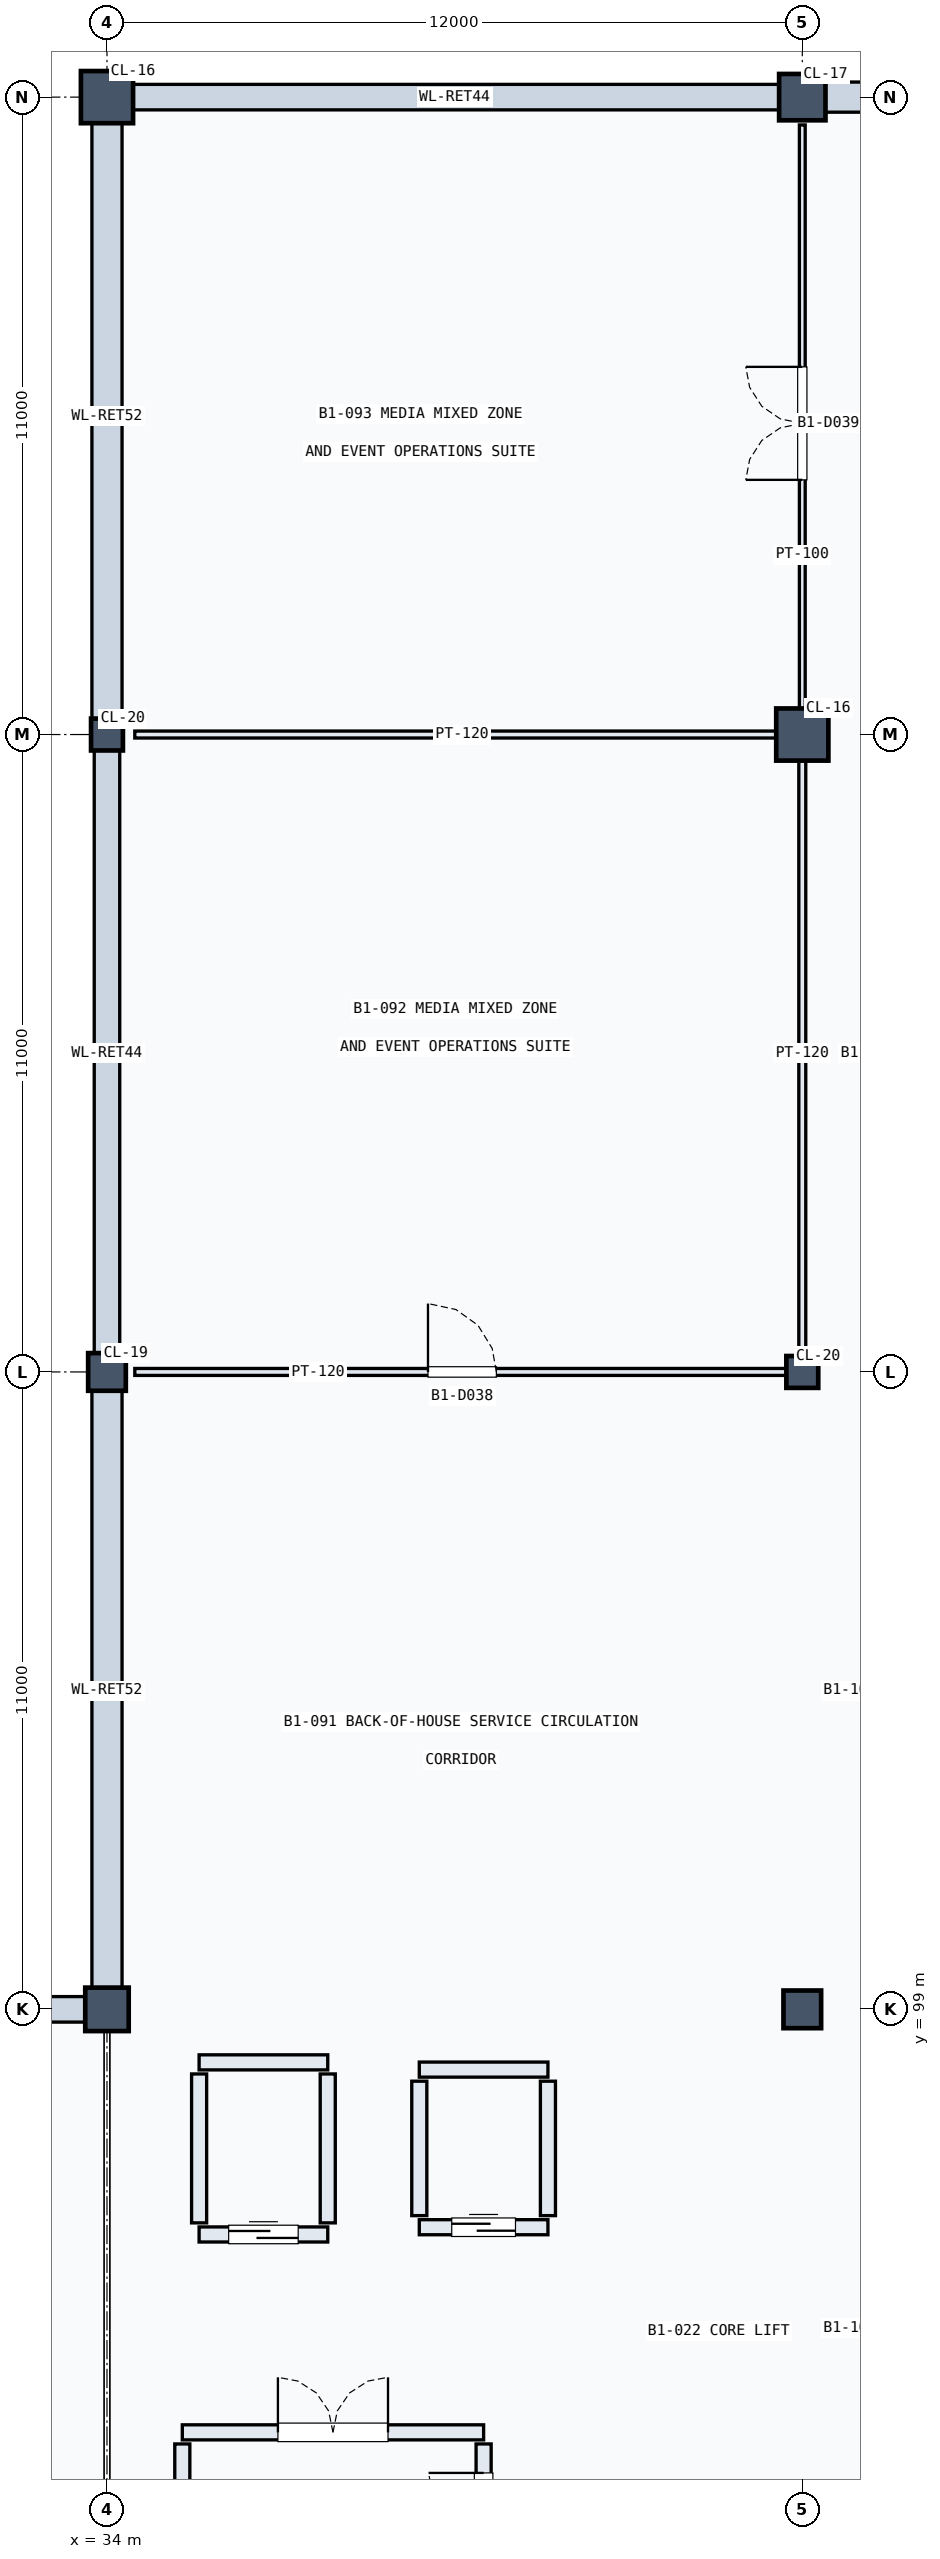
"""IFC4 building model, lengths in metres.
Left out: names, types, materials, properties, quantities, classifications, styles, units other than length and angle.
Written with IfcOpenShell. Run it as: python <this file> out.ifc"""

import sys

from ifc_helpers import new_model, si_unit, direction, frame, frame_2d, origin, origin_2d, place, context, subcontext, project, spatial, rectangle, circle, extrude, element, fill, save


model = new_model("IFC4")
c1 = context("Model", 3, precision=1e-05, world=origin(), true_north=direction((0.0, 1.0)))
c2 = subcontext(c1, "Body", "Model", "MODEL_VIEW")
j1 = project(units=[si_unit("LENGTHUNIT", "METRE"), si_unit("PLANEANGLEUNIT", "RADIAN")], contexts=[c1])
p1 = place(None, origin())
s1 = spatial("IfcSite", under=j1, at=p1, CompositionType="ELEMENT")
p2 = place(p1, origin())
s2 = spatial("IfcBuilding", under=s1, at=p2, CompositionType="ELEMENT")
p3 = place(p2, frame((0.0, 0.0, -5.4)))
s3 = spatial("IfcBuildingStorey", under=s2, at=p3, CompositionType="ELEMENT", Elevation=-5.4)
p4 = place(p3, frame((34.0, 99.0, 0.0), z_axis=(0.0, 0.0, 1.0), x_axis=(1.0, 0.0, 0.0)))
e1 = element("IfcColumn", 1, at=p4, inside=s3, PredefinedType="COLUMN", context=c2, shape_type="SweptSolid", body=[
    extrude(circle(Radius=0.375, at=origin_2d()), origin(), (0.0, 0.0, 1.0), 5.4),
])
p5 = place(p3, frame((34.0, 110.0, 0.0), z_axis=(0.0, 0.0, 1.0), x_axis=(1.0, 0.0, 0.0)))
e2 = element("IfcColumn", 2, at=p5, inside=s3, PredefinedType="COLUMN", context=c2, shape_type="SweptSolid", body=[
    extrude(circle(Radius=0.325, at=origin_2d()), origin(), (0.0, 0.0, 1.0), 5.4),
])
p6 = place(p3, frame((34.0, 121.0, 0.0), z_axis=(0.0, 0.0, 1.0), x_axis=(1.0, 0.0, 0.0)))
e3 = element("IfcColumn", 3, at=p6, inside=s3, PredefinedType="COLUMN", context=c2, shape_type="SweptSolid", body=[
    extrude(circle(Radius=0.275, at=origin_2d()), origin(), (0.0, 0.0, 1.0), 5.4),
])
p7 = place(p3, frame((34.0, 132.0, 0.0), z_axis=(0.0, 0.0, 1.0), x_axis=(1.0, 0.0, 0.0)))
e4 = element("IfcColumn", 4, at=p7, inside=s3, PredefinedType="COLUMN", context=c2, shape_type="SweptSolid", body=[
    extrude(circle(Radius=0.45, at=origin_2d()), origin(), (0.0, 0.0, 1.0), 5.4),
])
p8 = place(p3, frame((46.0, 99.0, 0.0), z_axis=(0.0, 0.0, 1.0), x_axis=(1.0, 0.0, 0.0)))
e5 = element("IfcColumn", 5, at=p8, inside=s3, PredefinedType="COLUMN", context=c2, shape_type="SweptSolid", body=[
    extrude(circle(Radius=0.325, at=origin_2d()), origin(), (0.0, 0.0, 1.0), 5.4),
])
p9 = place(p3, frame((46.0, 110.0, 0.0), z_axis=(0.0, 0.0, 1.0), x_axis=(1.0, 0.0, 0.0)))
e6 = element("IfcColumn", 6, at=p9, inside=s3, PredefinedType="COLUMN", context=c2, shape_type="SweptSolid", body=[
    extrude(circle(Radius=0.275, at=origin_2d()), origin(), (0.0, 0.0, 1.0), 5.4),
])
p10 = place(p3, frame((46.0, 121.0, 0.0), z_axis=(0.0, 0.0, 1.0), x_axis=(1.0, 0.0, 0.0)))
e7 = element("IfcColumn", 7, at=p10, inside=s3, PredefinedType="COLUMN", context=c2, shape_type="SweptSolid", body=[
    extrude(circle(Radius=0.45, at=origin_2d()), origin(), (0.0, 0.0, 1.0), 5.4),
])
p11 = place(p3, frame((46.0, 132.0, 0.0), z_axis=(0.0, 0.0, 1.0), x_axis=(1.0, 0.0, 0.0)))
e8 = element("IfcColumn", 8, at=p11, inside=s3, PredefinedType="COLUMN", context=c2, shape_type="SweptSolid", body=[
    extrude(circle(Radius=0.4, at=origin_2d()), origin(), (0.0, 0.0, 1.0), 5.4),
])
p12 = place(p3, frame((22.22, 99.0, 0.0), z_axis=(0.0, 0.0, 1.0), x_axis=(1.0, 0.0, 0.0)))
e9 = element("IfcWall", 9, at=p12, inside=s3, PredefinedType="SOLIDWALL", context=c2, shape_type="SweptSolid", body=[
    extrude(rectangle(XDim=11.56, YDim=0.44, at=frame_2d((5.78, 0.0))), origin(), (0.0, 0.0, 1.0), 4.23),
])
p13 = place(p3, frame((34.0, 99.22, 0.0), z_axis=(0.0, 0.0, 1.0), x_axis=(0.0, 1.0, 0.0)))
e10 = element("IfcWall", 10, at=p13, inside=s3, PredefinedType="SOLIDWALL", context=c2, shape_type="SweptSolid", body=[
    extrude(rectangle(XDim=10.56, YDim=0.52, at=frame_2d((5.28, 0.0))), origin(), (0.0, 0.0, 1.0), 4.43),
])
p14 = place(p3, frame((34.0, 110.22, 0.0), z_axis=(0.0, 0.0, 1.0), x_axis=(0.0, 1.0, 0.0)))
e11 = element("IfcWall", 11, at=p14, inside=s3, PredefinedType="SOLIDWALL", context=c2, shape_type="SweptSolid", body=[
    extrude(rectangle(XDim=10.56, YDim=0.44, at=frame_2d((5.28, 0.0))), origin(), (0.0, 0.0, 1.0), 4.08),
])
p15 = place(p3, frame((34.22, 132.0, 0.0), z_axis=(0.0, 0.0, 1.0), x_axis=(1.0, 0.0, 0.0)))
e12 = element("IfcWall", 12, at=p15, inside=s3, PredefinedType="SOLIDWALL", context=c2, shape_type="SweptSolid", body=[
    extrude(rectangle(XDim=11.56, YDim=0.44, at=frame_2d((5.78, 0.0))), origin(), (0.0, 0.0, 1.0), 4.43),
])
p16 = place(p3, frame((34.0, 121.22, 0.0), z_axis=(0.0, 0.0, 1.0), x_axis=(0.0, 1.0, 0.0)))
e13 = element("IfcWall", 13, at=p16, inside=s3, PredefinedType="SOLIDWALL", context=c2, shape_type="SweptSolid", body=[
    extrude(rectangle(XDim=10.56, YDim=0.52, at=frame_2d((5.28, 0.0))), origin(), (0.0, 0.0, 1.0), 4.08),
])
p17 = place(p3, frame((46.22, 132.0, 0.0), z_axis=(0.0, 0.0, 1.0), x_axis=(1.0, 0.0, 0.0)))
e14 = element("IfcWall", 14, at=p17, inside=s3, PredefinedType="SOLIDWALL", context=c2, shape_type="SweptSolid", body=[
    extrude(rectangle(XDim=11.56, YDim=0.52, at=frame_2d((5.78, 0.0))), origin(), (0.0, 0.0, 1.0), 4.23),
])
p18 = place(p3, frame((35.59, 95.115, 0.0), z_axis=(0.0, 0.0, 1.0), x_axis=(1.0, 0.0, 0.0)))
e15 = element("IfcWall", 15, at=p18, inside=s3, PredefinedType="SOLIDWALL", context=c2, shape_type="SweptSolid", body=[
    extrude(rectangle(XDim=2.22, YDim=0.26, at=frame_2d((1.11, 0.0))), origin(), (0.0, 0.0, 1.0), 5.04),
])
p19 = place(p18, frame((0.51, 0.0, 0.0)))
e16 = element("IfcOpeningElement", 16, at=p19, cuts=e15, PredefinedType="OPENING", context=c2, shape_type="SweptSolid", body=[
    extrude(rectangle(XDim=1.2, YDim=2.2, at=frame_2d((0.6, 1.1))), frame((0.0, 0.14, 0.0), z_axis=(0.0, -1.0, 0.0), x_axis=(1.0, 0.0, 0.0)), (0.0, 0.0, 1.0), 0.28),
])
p20 = place(p3, frame((35.59, 98.085, 0.0), z_axis=(0.0, 0.0, 1.0), x_axis=(1.0, 0.0, 0.0)))
e17 = element("IfcWall", 17, at=p20, inside=s3, PredefinedType="SOLIDWALL", context=c2, shape_type="SweptSolid", body=[
    extrude(rectangle(XDim=2.22, YDim=0.26, at=frame_2d((1.11, 0.0))), origin(), (0.0, 0.0, 1.0), 5.04),
])
for number, where, z_axis, x_axis in (
    (18, (35.59, 95.315, 0.0), (0.0, 0.0, 1.0), (0.0, 1.0, 0.0)),
    (19, (37.81, 95.315, 0.0), (0.0, 0.0, 1.0), (0.0, 1.0, 0.0)),
):
    element("IfcWall", number, at=place(p3, frame(where, z_axis=z_axis, x_axis=x_axis)), inside=s3, PredefinedType="SOLIDWALL", context=c2, shape_type="SweptSolid", body=[
        extrude(rectangle(XDim=2.57, YDim=0.26, at=frame_2d((1.285, 0.0))), origin(), (0.0, 0.0, 1.0), 5.04),
    ])
p21 = place(p3, frame((39.39, 95.24, 0.0), z_axis=(0.0, 0.0, 1.0), x_axis=(1.0, 0.0, 0.0)))
e20 = element("IfcWall", 20, at=p21, inside=s3, PredefinedType="SOLIDWALL", context=c2, shape_type="SweptSolid", body=[
    extrude(rectangle(XDim=2.22, YDim=0.26, at=frame_2d((1.11, 0.0))), origin(), (0.0, 0.0, 1.0), 5.04),
])
p22 = place(p21, frame((0.56, 0.0, 0.0)))
e21 = element("IfcOpeningElement", 21, at=p22, cuts=e20, PredefinedType="OPENING", context=c2, shape_type="SweptSolid", body=[
    extrude(rectangle(XDim=1.1, YDim=2.15, at=frame_2d((0.55, 1.075))), frame((0.0, 0.14, 0.0), z_axis=(0.0, -1.0, 0.0), x_axis=(1.0, 0.0, 0.0)), (0.0, 0.0, 1.0), 0.28),
])
p23 = place(p3, frame((39.39, 97.96, 0.0), z_axis=(0.0, 0.0, 1.0), x_axis=(1.0, 0.0, 0.0)))
e22 = element("IfcWall", 22, at=p23, inside=s3, PredefinedType="SOLIDWALL", context=c2, shape_type="SweptSolid", body=[
    extrude(rectangle(XDim=2.22, YDim=0.26, at=frame_2d((1.11, 0.0))), origin(), (0.0, 0.0, 1.0), 5.04),
])
for number, where, z_axis, x_axis in (
    (23, (39.39, 95.44, 0.0), (0.0, 0.0, 1.0), (0.0, 1.0, 0.0)),
    (24, (41.61, 95.44, 0.0), (0.0, 0.0, 1.0), (0.0, 1.0, 0.0)),
):
    element("IfcWall", number, at=place(p3, frame(where, z_axis=z_axis, x_axis=x_axis)), inside=s3, PredefinedType="SOLIDWALL", context=c2, shape_type="SweptSolid", body=[
        extrude(rectangle(XDim=2.32, YDim=0.26, at=frame_2d((1.16, 0.0))), origin(), (0.0, 0.0, 1.0), 5.04),
    ])
p24 = place(p3, frame((35.3, 91.7, 0.0), z_axis=(0.0, 0.0, 1.0), x_axis=(1.0, 0.0, 0.0)))
e25 = element("IfcWall", 25, at=p24, inside=s3, PredefinedType="SOLIDWALL", context=c2, shape_type="SweptSolid", body=[
    extrude(rectangle(XDim=5.2, YDim=0.26, at=frame_2d((2.6, 0.0))), origin(), (0.0, 0.0, 1.0), 5.04),
])
p25 = place(p24, frame((1.65, 0.0, 0.0)))
e26 = element("IfcOpeningElement", 26, at=p25, cuts=e25, PredefinedType="OPENING", context=c2, shape_type="SweptSolid", body=[
    extrude(rectangle(XDim=1.9, YDim=2.2, at=frame_2d((0.95, 1.1))), frame((0.0, 0.14, 0.0), z_axis=(0.0, -1.0, 0.0), x_axis=(1.0, 0.0, 0.0)), (0.0, 0.0, 1.0), 0.28),
])
p26 = place(p3, frame((35.3, 88.6, 0.0), z_axis=(0.0, 0.0, 1.0), x_axis=(0.0, 1.0, 0.0)))
e27 = element("IfcWall", 27, at=p26, inside=s3, PredefinedType="SOLIDWALL", context=c2, shape_type="SweptSolid", body=[
    extrude(rectangle(XDim=2.9, YDim=0.26, at=frame_2d((1.45, 0.0))), origin(), (0.0, 0.0, 1.0), 5.04),
])
p27 = place(p3, frame((40.5, 88.6, 0.0), z_axis=(0.0, 0.0, 1.0), x_axis=(0.0, 1.0, 0.0)))
e28 = element("IfcWall", 28, at=p27, inside=s3, PredefinedType="SOLIDWALL", context=c2, shape_type="SweptSolid", body=[
    extrude(rectangle(XDim=2.9, YDim=0.26, at=frame_2d((1.45, 0.0))), origin(), (0.0, 0.0, 1.0), 5.04),
])
p28 = place(p27, frame((0.5, 0.0, 0.0)))
e29 = element("IfcOpeningElement", 29, at=p28, cuts=e28, PredefinedType="OPENING", context=c2, shape_type="SweptSolid", body=[
    extrude(rectangle(XDim=1.9, YDim=2.2, at=frame_2d((0.95, 1.1))), frame((0.0, 0.14, 0.0), z_axis=(0.0, -1.0, 0.0), x_axis=(1.0, 0.0, 0.0)), (0.0, 0.0, 1.0), 0.28),
])
p29 = place(p3, frame((34.48, 110.0, 0.0), z_axis=(0.0, 0.0, 1.0), x_axis=(1.0, 0.0, 0.0)))
e30 = element("IfcWall", 30, at=p29, inside=s3, PredefinedType="PARTITIONING", context=c2, shape_type="SweptSolid", body=[
    extrude(rectangle(XDim=11.3, YDim=0.12, at=frame_2d((5.65, 0.0))), origin(), (0.0, 0.0, 1.0), 4.13),
])
p30 = place(p29, frame((5.06, 0.0, 0.0)))
e31 = element("IfcOpeningElement", 31, at=p30, cuts=e30, PredefinedType="OPENING", context=c2, shape_type="SweptSolid", body=[
    extrude(rectangle(XDim=1.18, YDim=2.15, at=frame_2d((0.59, 1.075))), frame((0.0, 0.07, 0.0), z_axis=(0.0, -1.0, 0.0), x_axis=(1.0, 0.0, 0.0)), (0.0, 0.0, 1.0), 0.14),
])
p31 = place(p3, frame((46.0, 110.22, 0.0), z_axis=(0.0, 0.0, 1.0), x_axis=(0.0, 1.0, 0.0)))
e32 = element("IfcWall", 32, at=p31, inside=s3, PredefinedType="PARTITIONING", context=c2, shape_type="SweptSolid", body=[
    extrude(rectangle(XDim=10.56, YDim=0.12, at=frame_2d((5.28, 0.0))), origin(), (0.0, 0.0, 1.0), 4.08),
])
p32 = place(p3, frame((46.0, 121.22, 0.0), z_axis=(0.0, 0.0, 1.0), x_axis=(0.0, 1.0, 0.0)))
e33 = element("IfcWall", 33, at=p32, inside=s3, PredefinedType="PARTITIONING", context=c2, shape_type="SweptSolid", body=[
    extrude(rectangle(XDim=10.3, YDim=0.1, at=frame_2d((5.15, 0.0))), origin(), (0.0, 0.0, 1.0), 4.08),
])
p33 = place(p32, frame((4.175, 0.0, 0.0)))
e34 = element("IfcOpeningElement", 34, at=p33, cuts=e33, PredefinedType="OPENING", context=c2, shape_type="SweptSolid", body=[
    extrude(rectangle(XDim=1.95, YDim=2.4, at=frame_2d((0.975, 1.2))), frame((0.0, 0.06, 0.0), z_axis=(0.0, -1.0, 0.0), x_axis=(1.0, 0.0, 0.0)), (0.0, 0.0, 1.0), 0.12),
])
p34 = place(p3, frame((34.48, 121.0, 0.0), z_axis=(0.0, 0.0, 1.0), x_axis=(1.0, 0.0, 0.0)))
e35 = element("IfcWall", 35, at=p34, inside=s3, PredefinedType="PARTITIONING", context=c2, shape_type="SweptSolid", body=[
    extrude(rectangle(XDim=11.3, YDim=0.12, at=frame_2d((5.65, 0.0))), origin(), (0.0, 0.0, 1.0), 4.08),
])
p35 = place(p19, origin())
e36 = element("IfcDoor", 36, at=p35, inside=s3, OperationType="SLIDING_TO_LEFT", PredefinedType="DOOR", context=c2, shape_type="SweptSolid", body=[
    extrude(rectangle(XDim=1.2, YDim=2.2, at=frame_2d((0.6, 1.1))), frame((0.0, 0.025, 0.0), z_axis=(0.0, -1.0, 0.0), x_axis=(1.0, 0.0, 0.0)), (0.0, 0.0, 1.0), 0.05),
])
fill(e16, e36)
p36 = place(p22, origin())
e37 = element("IfcDoor", 37, at=p36, inside=s3, OperationType="SLIDING_TO_LEFT", PredefinedType="DOOR", context=c2, shape_type="SweptSolid", body=[
    extrude(rectangle(XDim=1.1, YDim=2.15, at=frame_2d((0.55, 1.075))), frame((0.0, 0.025, 0.0), z_axis=(0.0, -1.0, 0.0), x_axis=(1.0, 0.0, 0.0)), (0.0, 0.0, 1.0), 0.05),
])
fill(e21, e37)
p37 = place(p25, origin())
e38 = element("IfcDoor", 38, at=p37, inside=s3, OperationType="DOUBLE_DOOR_SINGLE_SWING", PredefinedType="DOOR", context=c2, shape_type="SweptSolid", body=[
    extrude(rectangle(XDim=1.9, YDim=2.2, at=frame_2d((0.95, 1.1))), frame((0.0, 0.025, 0.0), z_axis=(0.0, -1.0, 0.0), x_axis=(1.0, 0.0, 0.0)), (0.0, 0.0, 1.0), 0.05),
])
fill(e26, e38)
p38 = place(p28, origin())
e39 = element("IfcDoor", 39, at=p38, inside=s3, OperationType="DOUBLE_DOOR_SINGLE_SWING", PredefinedType="DOOR", context=c2, shape_type="SweptSolid", body=[
    extrude(rectangle(XDim=1.9, YDim=2.2, at=frame_2d((0.95, 1.1))), frame((0.0, 0.025, 0.0), z_axis=(0.0, -1.0, 0.0), x_axis=(1.0, 0.0, 0.0)), (0.0, 0.0, 1.0), 0.05),
])
fill(e29, e39)
p39 = place(p30, origin())
e40 = element("IfcDoor", 40, at=p39, inside=s3, OperationType="SINGLE_SWING_LEFT", PredefinedType="DOOR", context=c2, shape_type="SweptSolid", body=[
    extrude(rectangle(XDim=1.18, YDim=2.15, at=frame_2d((0.59, 1.075))), frame((0.0, 0.025, 0.0), z_axis=(0.0, -1.0, 0.0), x_axis=(1.0, 0.0, 0.0)), (0.0, 0.0, 1.0), 0.05),
])
fill(e31, e40)
p40 = place(p33, origin())
e41 = element("IfcDoor", 41, at=p40, inside=s3, OperationType="DOUBLE_DOOR_SINGLE_SWING", PredefinedType="DOOR", context=c2, shape_type="SweptSolid", body=[
    extrude(rectangle(XDim=1.95, YDim=2.4, at=frame_2d((0.975, 1.2))), frame((0.0, 0.025, 0.0), z_axis=(0.0, -1.0, 0.0), x_axis=(1.0, 0.0, 0.0)), (0.0, 0.0, 1.0), 0.05),
])
fill(e34, e41)
save(model, sys.argv[1])
